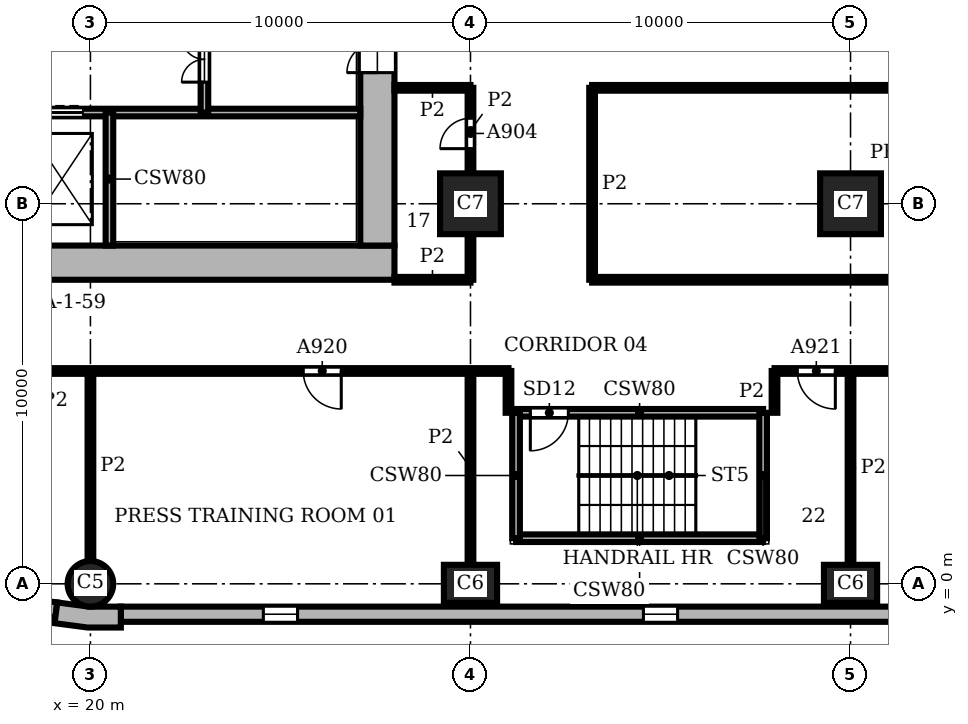
"""IFC4 building model, lengths in metres.
Left out: names, types, materials, properties, quantities, classifications, styles, units other than length and angle.
Written with IfcOpenShell. Run it as: python <this file> out.ifc"""

import sys

from ifc_helpers import new_model, si_unit, direction, frame, frame_2d, origin, origin_2d, place, context, subcontext, project, spatial, polyline, rectangle, circle, outline, extrude, element, fill, save


model = new_model("IFC4")
c1 = context("Model", 3, precision=1e-05, world=origin(), true_north=direction((0.0, 1.0)))
c2 = subcontext(c1, "Body", "Model", "MODEL_VIEW")
j1 = project(units=[si_unit("LENGTHUNIT", "METRE"), si_unit("PLANEANGLEUNIT", "RADIAN")], contexts=[c1])
p1 = place(None, origin())
s1 = spatial("IfcSite", under=j1, at=p1, CompositionType="ELEMENT")
p2 = place(p1, origin())
s2 = spatial("IfcBuilding", under=s1, at=p2, CompositionType="ELEMENT")
p3 = place(p2, frame((0.0, 0.0, 113.4)))
s3 = spatial("IfcBuildingStorey", under=s2, at=p3, CompositionType="ELEMENT", Elevation=113.4)
p4 = place(p3, frame((20.0, 0.0, 0.0), z_axis=(0.0, 0.0, 1.0), x_axis=(1.0, 0.0, 0.0)))
e1 = element("IfcColumn", 1, at=p4, inside=s3, PredefinedType="COLUMN", context=c2, shape_type="SweptSolid", body=[
    extrude(circle(Radius=0.6, at=origin_2d()), origin(), (0.0, 0.0, 1.0), 3.9),
])
for number, where, z_axis, x_axis in (
    (2, (30.0, 0.0, 0.0), (0.0, 0.0, 1.0), (1.0, 0.0, 0.0)),
    (3, (40.0, 0.0, 0.0), (0.0, 0.0, 1.0), (1.0, 0.0, 0.0)),
):
    element("IfcColumn", number, at=place(p3, frame(where, z_axis=z_axis, x_axis=x_axis)), inside=s3, PredefinedType="COLUMN", context=c2, shape_type="SweptSolid", body=[
        extrude(rectangle(XDim=1.4, YDim=1.0, at=origin_2d()), origin(), (0.0, 0.0, 1.0), 3.9),
    ])
for number, where, z_axis, x_axis in (
    (4, (30.0, 10.0, 0.0), (0.0, 0.0, 1.0), (1.0, 0.0, 0.0)),
    (5, (40.0, 10.0, 0.0), (0.0, 0.0, 1.0), (1.0, 0.0, 0.0)),
):
    element("IfcColumn", number, at=place(p3, frame(where, z_axis=z_axis, x_axis=x_axis)), inside=s3, PredefinedType="COLUMN", context=c2, shape_type="SweptSolid", body=[
        extrude(rectangle(XDim=1.6, YDim=1.6, at=origin_2d()), origin(), (0.0, 0.0, 1.0), 3.9),
    ])
p5 = place(p3, frame((8.0, 8.45, 0.0), z_axis=(0.0, 0.0, 1.0), x_axis=(1.0, 0.0, 0.0)))
e6 = element("IfcWall", 6, at=p5, inside=s3, PredefinedType="SHEAR", context=c2, shape_type="SweptSolid", body=[
    extrude(rectangle(XDim=20.0, YDim=0.9, at=frame_2d((10.0, 0.0))), origin(), (0.0, 0.0, 1.0), 3.9),
])
p6 = place(p3, frame((27.55, 8.9, 0.0), z_axis=(0.0, 0.0, 1.0), x_axis=(0.0, 1.0, 0.0)))
e7 = element("IfcWall", 7, at=p6, inside=s3, PredefinedType="SHEAR", context=c2, shape_type="SweptSolid", body=[
    extrude(rectangle(XDim=18.2, YDim=0.9, at=frame_2d((9.1, 0.0))), origin(), (0.0, 0.0, 1.0), 3.9),
])
p7 = place(p6, frame((4.55, 0.0, 0.0)))
e8 = element("IfcOpeningElement", 8, at=p7, cuts=e7, PredefinedType="OPENING", context=c2, shape_type="SweptSolid", body=[
    extrude(rectangle(XDim=1.6, YDim=2.1, at=frame_2d((0.8, 1.05))), frame((0.0, 0.46, 0.0), z_axis=(0.0, -1.0, 0.0), x_axis=(1.0, 0.0, 0.0)), (0.0, 0.0, 1.0), 0.92),
])
p8 = place(p3, origin())
e9 = element("IfcWall", 9, at=p8, inside=s3, PredefinedType="SOLIDWALL", context=c2, shape_type="SweptSolid", body=[
    extrude(outline(polyline([(19.076, -0.887), (19.057, -1.036), (19.925, -1.15), (20.8, -1.15), (20.8, -1.0), (20.8, -0.6), (19.961, -0.6), (19.128, -0.49), (19.076, -0.887)])), origin(), (0.0, 0.0, 1.0), 3.9),
])
p9 = place(p3, frame((20.8, -0.8, 0.0), z_axis=(0.0, 0.0, 1.0), x_axis=(1.0, 0.0, 0.0)))
e10 = element("IfcWall", 10, at=p9, inside=s3, PredefinedType="SOLIDWALL", context=c2, shape_type="SweptSolid", body=[
    extrude(rectangle(XDim=48.4, YDim=0.4, at=frame_2d((24.2, 0.0))), origin(), (0.0, 0.0, 1.0), 3.9),
])
p10 = place(p9, frame((3.75, 0.0, 0.9)))
e11 = element("IfcOpeningElement", 11, at=p10, cuts=e10, PredefinedType="OPENING", context=c2, shape_type="SweptSolid", body=[
    extrude(rectangle(XDim=0.9, YDim=2.35, at=frame_2d((0.45, 1.175))), frame((0.0, 0.21, 0.0), z_axis=(0.0, -1.0, 0.0), x_axis=(1.0, 0.0, 0.0)), (0.0, 0.0, 1.0), 0.42),
])
p11 = place(p9, frame((13.75, 0.0, 0.9)))
e12 = element("IfcOpeningElement", 12, at=p11, cuts=e10, PredefinedType="OPENING", context=c2, shape_type="SweptSolid", body=[
    extrude(rectangle(XDim=0.9, YDim=2.35, at=frame_2d((0.45, 1.175))), frame((0.0, 0.21, 0.0), z_axis=(0.0, -1.0, 0.0), x_axis=(1.0, 0.0, 0.0)), (0.0, 0.0, 1.0), 0.42),
])
p12 = place(p9, frame((23.75, 0.0, 0.9)))
e13 = element("IfcOpeningElement", 13, at=p12, cuts=e10, PredefinedType="OPENING", context=c2, shape_type="SweptSolid", body=[
    extrude(rectangle(XDim=0.9, YDim=2.35, at=frame_2d((0.45, 1.175))), frame((0.0, 0.21, 0.0), z_axis=(0.0, -1.0, 0.0), x_axis=(1.0, 0.0, 0.0)), (0.0, 0.0, 1.0), 0.42),
])
p13 = place(p9, frame((33.75, 0.0, 0.9)))
e14 = element("IfcOpeningElement", 14, at=p13, cuts=e10, PredefinedType="OPENING", context=c2, shape_type="SweptSolid", body=[
    extrude(rectangle(XDim=0.9, YDim=2.35, at=frame_2d((0.45, 1.175))), frame((0.0, 0.21, 0.0), z_axis=(0.0, -1.0, 0.0), x_axis=(1.0, 0.0, 0.0)), (0.0, 0.0, 1.0), 0.42),
])
p14 = place(p9, frame((43.75, 0.0, 0.9)))
e15 = element("IfcOpeningElement", 15, at=p14, cuts=e10, PredefinedType="OPENING", context=c2, shape_type="SweptSolid", body=[
    extrude(rectangle(XDim=0.9, YDim=2.35, at=frame_2d((0.45, 1.175))), frame((0.0, 0.21, 0.0), z_axis=(0.0, -1.0, 0.0), x_axis=(1.0, 0.0, 0.0)), (0.0, 0.0, 1.0), 0.42),
])
p15 = place(p3, frame((15.017, -0.151, 0.0), z_axis=(0.0, 0.0, 1.0), x_axis=(0.991446429508, -0.130514280502, 0.0)))
e16 = element("IfcWall", 16, at=p15, inside=s3, PredefinedType="SOLIDWALL", context=c2, shape_type="SweptSolid", body=[
    extrude(rectangle(XDim=4.121, YDim=0.4, at=frame_2d((2.061, 0.0))), origin(), (0.0, 0.0, 1.0), 3.9),
])
p16 = place(p15, frame((1.611, 0.0, 0.9)))
e17 = element("IfcOpeningElement", 17, at=p16, cuts=e16, PredefinedType="OPENING", context=c2, shape_type="SweptSolid", body=[
    extrude(rectangle(XDim=0.9, YDim=2.35, at=frame_2d((0.45, 1.175))), frame((0.0, 0.21, 0.0), z_axis=(0.0, -1.0, 0.0), x_axis=(1.0, 0.0, 0.0)), (0.0, 0.0, 1.0), 0.42),
])
p17 = place(p3, frame((31.2, 1.2, 0.0), z_axis=(0.0, 0.0, 1.0), x_axis=(1.0, 0.0, 0.0)))
e18 = element("IfcWall", 18, at=p17, inside=s3, PredefinedType="SHEAR", context=c2, shape_type="SweptSolid", body=[
    extrude(rectangle(XDim=6.5, YDim=0.2, at=frame_2d((3.25, 0.0))), origin(), (0.0, 0.0, 1.0), 3.45),
])
p18 = place(p3, frame((31.2, 4.5, 0.0), z_axis=(0.0, 0.0, 1.0), x_axis=(1.0, 0.0, 0.0)))
e19 = element("IfcWall", 19, at=p18, inside=s3, PredefinedType="SHEAR", context=c2, shape_type="SweptSolid", body=[
    extrude(rectangle(XDim=6.5, YDim=0.2, at=frame_2d((3.25, 0.0))), origin(), (0.0, 0.0, 1.0), 3.45),
])
p19 = place(p18, frame((0.375, 0.0, 0.0)))
e20 = element("IfcOpeningElement", 20, at=p19, cuts=e19, PredefinedType="OPENING", context=c2, shape_type="SweptSolid", body=[
    extrude(rectangle(XDim=1.0, YDim=2.1, at=frame_2d((0.5, 1.05))), frame((0.0, 0.11, 0.0), z_axis=(0.0, -1.0, 0.0), x_axis=(1.0, 0.0, 0.0)), (0.0, 0.0, 1.0), 0.22),
])
p20 = place(p3, frame((13.8, 12.4, 0.0), z_axis=(0.0, 0.0, 1.0), x_axis=(1.0, 0.0, 0.0)))
e21 = element("IfcWall", 21, at=p20, inside=s3, PredefinedType="SHEAR", context=c2, shape_type="SweptSolid", body=[
    extrude(rectangle(XDim=13.3, YDim=0.2, at=frame_2d((6.65, 0.0))), origin(), (0.0, 0.0, 1.0), 3.45),
])
p21 = place(p20, frame((2.4, 0.0, 0.0)))
e22 = element("IfcOpeningElement", 22, at=p21, cuts=e21, PredefinedType="OPENING", context=c2, shape_type="SweptSolid", body=[
    extrude(rectangle(XDim=1.1, YDim=2.1, at=frame_2d((0.55, 1.05))), frame((0.0, 0.11, 0.0), z_axis=(0.0, -1.0, 0.0), x_axis=(1.0, 0.0, 0.0)), (0.0, 0.0, 1.0), 0.22),
])
p22 = place(p20, frame((4.9, 0.0, 0.0)))
e23 = element("IfcOpeningElement", 23, at=p22, cuts=e21, PredefinedType="OPENING", context=c2, shape_type="SweptSolid", body=[
    extrude(rectangle(XDim=1.1, YDim=2.1, at=frame_2d((0.55, 1.05))), frame((0.0, 0.11, 0.0), z_axis=(0.0, -1.0, 0.0), x_axis=(1.0, 0.0, 0.0)), (0.0, 0.0, 1.0), 0.22),
])
p23 = place(p20, frame((0.25, 0.0, 0.0)))
e24 = element("IfcOpeningElement", 24, at=p23, cuts=e21, PredefinedType="OPENING", context=c2, shape_type="SweptSolid", body=[
    extrude(rectangle(XDim=1.0, YDim=2.1, at=frame_2d((0.5, 1.05))), frame((0.0, 0.11, 0.0), z_axis=(0.0, -1.0, 0.0), x_axis=(1.0, 0.0, 0.0)), (0.0, 0.0, 1.0), 0.22),
])
p24 = place(p3, frame((20.5, 8.9, 0.0), z_axis=(0.0, 0.0, 1.0), x_axis=(0.0, 1.0, 0.0)))
e25 = element("IfcWall", 25, at=p24, inside=s3, PredefinedType="SHEAR", context=c2, shape_type="SweptSolid", body=[
    extrude(rectangle(XDim=3.5, YDim=0.2, at=frame_2d((1.75, 0.0))), origin(), (0.0, 0.0, 1.0), 3.45),
])
p25 = place(p3, frame((23.0, 12.4, 0.0), z_axis=(0.0, 0.0, 1.0), x_axis=(0.0, 1.0, 0.0)))
e26 = element("IfcWall", 26, at=p25, inside=s3, PredefinedType="SHEAR", context=c2, shape_type="SweptSolid", body=[
    extrude(rectangle(XDim=2.8, YDim=0.2, at=frame_2d((1.4, 0.0))), origin(), (0.0, 0.0, 1.0), 3.45),
])
p26 = place(p25, frame((0.8, 0.0, 0.0)))
e27 = element("IfcOpeningElement", 27, at=p26, cuts=e26, PredefinedType="OPENING", context=c2, shape_type="SweptSolid", body=[
    extrude(rectangle(XDim=1.2, YDim=2.1, at=frame_2d((0.6, 1.05))), frame((0.0, 0.11, 0.0), z_axis=(0.0, -1.0, 0.0), x_axis=(1.0, 0.0, 0.0)), (0.0, 0.0, 1.0), 0.22),
])
for number, where, z_axis, x_axis in (
    (28, (31.2, 1.2, 0.0), (0.0, 0.0, 1.0), (0.0, 1.0, 0.0)),
    (29, (37.7, 1.2, 0.0), (0.0, 0.0, 1.0), (0.0, 1.0, 0.0)),
):
    element("IfcWall", number, at=place(p3, frame(where, z_axis=z_axis, x_axis=x_axis)), inside=s3, PredefinedType="SHEAR", context=c2, shape_type="SweptSolid", body=[
        extrude(rectangle(XDim=3.3, YDim=0.2, at=frame_2d((1.65, 0.0))), origin(), (0.0, 0.0, 1.0), 3.45),
    ])
p27 = place(p3, frame((20.0, 0.6, 0.0), z_axis=(0.0, 0.0, 1.0), x_axis=(0.0, 1.0, 0.0)))
e30 = element("IfcWall", 30, at=p27, inside=s3, PredefinedType="PARTITIONING", context=c2, shape_type="SweptSolid", body=[
    extrude(rectangle(XDim=5.0, YDim=0.15, at=frame_2d((2.5, 0.0))), origin(), (0.0, 0.0, 1.0), 3.45),
])
p28 = place(p3, frame((30.0, 0.5, 0.0), z_axis=(0.0, 0.0, 1.0), x_axis=(0.0, 1.0, 0.0)))
e31 = element("IfcWall", 31, at=p28, inside=s3, PredefinedType="PARTITIONING", context=c2, shape_type="SweptSolid", body=[
    extrude(rectangle(XDim=5.1, YDim=0.15, at=frame_2d((2.55, 0.0))), origin(), (0.0, 0.0, 1.0), 3.45),
])
p29 = place(p3, frame((30.0, 8.0, 0.0), z_axis=(0.0, 0.0, 1.0), x_axis=(0.0, 1.0, 0.0)))
e32 = element("IfcWall", 32, at=p29, inside=s3, PredefinedType="PARTITIONING", context=c2, shape_type="SweptSolid", body=[
    extrude(rectangle(XDim=1.2, YDim=0.15, at=frame_2d((0.6, 0.0))), origin(), (0.0, 0.0, 1.0), 3.45),
])
p30 = place(p3, frame((30.0, 10.8, 0.0), z_axis=(0.0, 0.0, 1.0), x_axis=(0.0, 1.0, 0.0)))
e33 = element("IfcWall", 33, at=p30, inside=s3, PredefinedType="PARTITIONING", context=c2, shape_type="SweptSolid", body=[
    extrude(rectangle(XDim=2.25, YDim=0.15, at=frame_2d((1.125, 0.0))), origin(), (0.0, 0.0, 1.0), 3.45),
])
p31 = place(p30, frame((0.65, 0.0, 0.0)))
e34 = element("IfcOpeningElement", 34, at=p31, cuts=e33, PredefinedType="OPENING", context=c2, shape_type="SweptSolid", body=[
    extrude(rectangle(XDim=0.8, YDim=2.1, at=frame_2d((0.4, 1.05))), frame((0.0, 0.085, 0.0), z_axis=(0.0, -1.0, 0.0), x_axis=(1.0, 0.0, 0.0)), (0.0, 0.0, 1.0), 0.17),
])
p32 = place(p3, frame((31.0, 4.5, 0.0), z_axis=(0.0, 0.0, 1.0), x_axis=(0.0, 1.0, 0.0)))
e35 = element("IfcWall", 35, at=p32, inside=s3, PredefinedType="PARTITIONING", context=c2, shape_type="SweptSolid", body=[
    extrude(rectangle(XDim=1.1, YDim=0.15, at=frame_2d((0.55, 0.0))), origin(), (0.0, 0.0, 1.0), 3.45),
])
p33 = place(p3, frame((33.2, 8.0, 0.0), z_axis=(0.0, 0.0, 1.0), x_axis=(0.0, 1.0, 0.0)))
e36 = element("IfcWall", 36, at=p33, inside=s3, PredefinedType="PARTITIONING", context=c2, shape_type="SweptSolid", body=[
    extrude(rectangle(XDim=5.05, YDim=0.15, at=frame_2d((2.525, 0.0))), origin(), (0.0, 0.0, 1.0), 3.45),
])
p34 = place(p3, frame((38.0, 4.5, 0.0), z_axis=(0.0, 0.0, 1.0), x_axis=(0.0, 1.0, 0.0)))
e37 = element("IfcWall", 37, at=p34, inside=s3, PredefinedType="PARTITIONING", context=c2, shape_type="SweptSolid", body=[
    extrude(rectangle(XDim=1.1, YDim=0.15, at=frame_2d((0.55, 0.0))), origin(), (0.0, 0.0, 1.0), 3.45),
])
p35 = place(p3, frame((40.0, 0.5, 0.0), z_axis=(0.0, 0.0, 1.0), x_axis=(0.0, 1.0, 0.0)))
e38 = element("IfcWall", 38, at=p35, inside=s3, PredefinedType="PARTITIONING", context=c2, shape_type="SweptSolid", body=[
    extrude(rectangle(XDim=5.1, YDim=0.15, at=frame_2d((2.55, 0.0))), origin(), (0.0, 0.0, 1.0), 3.45),
])
p36 = place(p3, frame((5.6, 5.6, 0.0), z_axis=(0.0, 0.0, 1.0), x_axis=(1.0, 0.0, 0.0)))
e39 = element("IfcWall", 39, at=p36, inside=s3, PredefinedType="PARTITIONING", context=c2, shape_type="SweptSolid", body=[
    extrude(rectangle(XDim=25.4, YDim=0.15, at=frame_2d((12.7, 0.0))), origin(), (0.0, 0.0, 1.0), 3.45),
])
p37 = place(p36, frame((3.6, 0.0, 0.0)))
e40 = element("IfcOpeningElement", 40, at=p37, cuts=e39, PredefinedType="OPENING", context=c2, shape_type="SweptSolid", body=[
    extrude(rectangle(XDim=1.0, YDim=2.1, at=frame_2d((0.5, 1.05))), frame((0.0, 0.085, 0.0), z_axis=(0.0, -1.0, 0.0), x_axis=(1.0, 0.0, 0.0)), (0.0, 0.0, 1.0), 0.17),
])
p38 = place(p36, frame((11.75, 0.0, 0.0)))
e41 = element("IfcOpeningElement", 41, at=p38, cuts=e39, PredefinedType="OPENING", context=c2, shape_type="SweptSolid", body=[
    extrude(rectangle(XDim=1.0, YDim=2.1, at=frame_2d((0.5, 1.05))), frame((0.0, 0.085, 0.0), z_axis=(0.0, -1.0, 0.0), x_axis=(1.0, 0.0, 0.0)), (0.0, 0.0, 1.0), 0.17),
])
p39 = place(p36, frame((20.0, 0.0, 0.0)))
e42 = element("IfcOpeningElement", 42, at=p39, cuts=e39, PredefinedType="OPENING", context=c2, shape_type="SweptSolid", body=[
    extrude(rectangle(XDim=1.0, YDim=2.1, at=frame_2d((0.5, 1.05))), frame((0.0, 0.085, 0.0), z_axis=(0.0, -1.0, 0.0), x_axis=(1.0, 0.0, 0.0)), (0.0, 0.0, 1.0), 0.17),
])
p40 = place(p3, frame((38.0, 5.6, 0.0), z_axis=(0.0, 0.0, 1.0), x_axis=(1.0, 0.0, 0.0)))
e43 = element("IfcWall", 43, at=p40, inside=s3, PredefinedType="PARTITIONING", context=c2, shape_type="SweptSolid", body=[
    extrude(rectangle(XDim=27.0, YDim=0.15, at=frame_2d((13.5, 0.0))), origin(), (0.0, 0.0, 1.0), 3.45),
])
p41 = place(p40, frame((0.6, 0.0, 0.0)))
e44 = element("IfcOpeningElement", 44, at=p41, cuts=e43, PredefinedType="OPENING", context=c2, shape_type="SweptSolid", body=[
    extrude(rectangle(XDim=1.0, YDim=2.1, at=frame_2d((0.5, 1.05))), frame((0.0, 0.085, 0.0), z_axis=(0.0, -1.0, 0.0), x_axis=(1.0, 0.0, 0.0)), (0.0, 0.0, 1.0), 0.17),
])
p42 = place(p40, frame((6.1, 0.0, 0.0)))
e45 = element("IfcOpeningElement", 45, at=p42, cuts=e43, PredefinedType="OPENING", context=c2, shape_type="SweptSolid", body=[
    extrude(rectangle(XDim=1.0, YDim=2.1, at=frame_2d((0.5, 1.05))), frame((0.0, 0.085, 0.0), z_axis=(0.0, -1.0, 0.0), x_axis=(1.0, 0.0, 0.0)), (0.0, 0.0, 1.0), 0.17),
])
p43 = place(p40, frame((15.85, 0.0, 0.0)))
e46 = element("IfcOpeningElement", 46, at=p43, cuts=e43, PredefinedType="OPENING", context=c2, shape_type="SweptSolid", body=[
    extrude(rectangle(XDim=1.0, YDim=2.1, at=frame_2d((0.5, 1.05))), frame((0.0, 0.085, 0.0), z_axis=(0.0, -1.0, 0.0), x_axis=(1.0, 0.0, 0.0)), (0.0, 0.0, 1.0), 0.17),
])
p44 = place(p3, frame((28.0, 8.0, 0.0), z_axis=(0.0, 0.0, 1.0), x_axis=(1.0, 0.0, 0.0)))
e47 = element("IfcWall", 47, at=p44, inside=s3, PredefinedType="PARTITIONING", context=c2, shape_type="SweptSolid", body=[
    extrude(rectangle(XDim=2.0, YDim=0.15, at=frame_2d((1.0, 0.0))), origin(), (0.0, 0.0, 1.0), 3.45),
])
p45 = place(p3, frame((33.2, 8.0, 0.0), z_axis=(0.0, 0.0, 1.0), x_axis=(1.0, 0.0, 0.0)))
e48 = element("IfcWall", 48, at=p45, inside=s3, PredefinedType="PARTITIONING", context=c2, shape_type="SweptSolid", body=[
    extrude(rectangle(XDim=29.1, YDim=0.15, at=frame_2d((14.55, 0.0))), origin(), (0.0, 0.0, 1.0), 3.45),
])
p46 = place(p3, frame((28.0, 13.05, 0.0), z_axis=(0.0, 0.0, 1.0), x_axis=(1.0, 0.0, 0.0)))
e49 = element("IfcWall", 49, at=p46, inside=s3, PredefinedType="PARTITIONING", context=c2, shape_type="SweptSolid", body=[
    extrude(rectangle(XDim=2.0, YDim=0.15, at=frame_2d((1.0, 0.0))), origin(), (0.0, 0.0, 1.0), 3.45),
])
p47 = place(p3, frame((33.2, 13.05, 0.0), z_axis=(0.0, 0.0, 1.0), x_axis=(1.0, 0.0, 0.0)))
e50 = element("IfcWall", 50, at=p47, inside=s3, PredefinedType="PARTITIONING", context=c2, shape_type="SweptSolid", body=[
    extrude(rectangle(XDim=29.1, YDim=0.15, at=frame_2d((14.55, 0.0))), origin(), (0.0, 0.0, 1.0), 3.45),
])
p48 = place(p47, frame((14.1, 0.0, 0.0)))
e51 = element("IfcOpeningElement", 51, at=p48, cuts=e50, PredefinedType="OPENING", context=c2, shape_type="SweptSolid", body=[
    extrude(rectangle(XDim=1.0, YDim=2.1, at=frame_2d((0.5, 1.05))), frame((0.0, 0.085, 0.0), z_axis=(0.0, -1.0, 0.0), x_axis=(1.0, 0.0, 0.0)), (0.0, 0.0, 1.0), 0.17),
])
p49 = place(p10, origin())
e52 = element("IfcWindow", 52, at=p49, inside=s3, PartitioningType="SINGLE_PANEL", PredefinedType="WINDOW", context=c2, shape_type="SweptSolid", body=[
    extrude(rectangle(XDim=0.9, YDim=2.35, at=frame_2d((0.45, 1.175))), frame((0.0, 0.16, 0.0), z_axis=(0.0, -1.0, 0.0), x_axis=(1.0, 0.0, 0.0)), (0.0, 0.0, 1.0), 0.06),
])
fill(e11, e52)
p50 = place(p11, origin())
e53 = element("IfcWindow", 53, at=p50, inside=s3, PartitioningType="SINGLE_PANEL", PredefinedType="WINDOW", context=c2, shape_type="SweptSolid", body=[
    extrude(rectangle(XDim=0.9, YDim=2.35, at=frame_2d((0.45, 1.175))), frame((0.0, 0.16, 0.0), z_axis=(0.0, -1.0, 0.0), x_axis=(1.0, 0.0, 0.0)), (0.0, 0.0, 1.0), 0.06),
])
fill(e12, e53)
p51 = place(p22, origin())
e54 = element("IfcDoor", 54, at=p51, inside=s3, OperationType="DOUBLE_DOOR_SLIDING", PredefinedType="DOOR", context=c2, shape_type="SweptSolid", body=[
    extrude(rectangle(XDim=1.1, YDim=2.1, at=frame_2d((0.55, 1.05))), frame((0.0, 0.025, 0.0), z_axis=(0.0, -1.0, 0.0), x_axis=(1.0, 0.0, 0.0)), (0.0, 0.0, 1.0), 0.05),
])
fill(e23, e54)
p52 = place(p19, frame((1.0, 0.0, 0.0), z_axis=(0.0, 0.0, 1.0), x_axis=(-1.0, 0.0, 0.0)))
e55 = element("IfcDoor", 55, at=p52, inside=s3, OperationType="SINGLE_SWING_RIGHT", PredefinedType="DOOR", context=c2, shape_type="SweptSolid", body=[
    extrude(rectangle(XDim=1.0, YDim=2.1, at=frame_2d((0.5, 1.05))), frame((0.0, 0.025, 0.0), z_axis=(0.0, -1.0, 0.0), x_axis=(1.0, 0.0, 0.0)), (0.0, 0.0, 1.0), 0.05),
])
fill(e20, e55)
p53 = place(p26, origin())
e56 = element("IfcDoor", 56, at=p53, inside=s3, OperationType="DOUBLE_DOOR_SINGLE_SWING", PredefinedType="DOOR", context=c2, shape_type="SweptSolid", body=[
    extrude(rectangle(XDim=1.2, YDim=2.1, at=frame_2d((0.6, 1.05))), frame((0.0, 0.025, 0.0), z_axis=(0.0, -1.0, 0.0), x_axis=(1.0, 0.0, 0.0)), (0.0, 0.0, 1.0), 0.05),
])
fill(e27, e56)
p54 = place(p7, origin())
e57 = element("IfcDoor", 57, at=p54, inside=s3, OperationType="DOUBLE_DOOR_SINGLE_SWING", PredefinedType="DOOR", context=c2, shape_type="SweptSolid", body=[
    extrude(rectangle(XDim=1.6, YDim=2.1, at=frame_2d((0.8, 1.05))), frame((0.0, 0.025, 0.0), z_axis=(0.0, -1.0, 0.0), x_axis=(1.0, 0.0, 0.0)), (0.0, 0.0, 1.0), 0.05),
])
fill(e8, e57)
p55 = place(p31, origin())
e58 = element("IfcDoor", 58, at=p55, inside=s3, OperationType="SINGLE_SWING_LEFT", PredefinedType="DOOR", context=c2, shape_type="SweptSolid", body=[
    extrude(rectangle(XDim=0.8, YDim=2.1, at=frame_2d((0.4, 1.05))), frame((0.0, 0.025, 0.0), z_axis=(0.0, -1.0, 0.0), x_axis=(1.0, 0.0, 0.0)), (0.0, 0.0, 1.0), 0.05),
])
fill(e34, e58)
p56 = place(p39, frame((1.0, 0.0, 0.0), z_axis=(0.0, 0.0, 1.0), x_axis=(-1.0, 0.0, 0.0)))
e59 = element("IfcDoor", 59, at=p56, inside=s3, OperationType="SINGLE_SWING_LEFT", PredefinedType="DOOR", context=c2, shape_type="SweptSolid", body=[
    extrude(rectangle(XDim=1.0, YDim=2.1, at=frame_2d((0.5, 1.05))), frame((0.0, 0.025, 0.0), z_axis=(0.0, -1.0, 0.0), x_axis=(1.0, 0.0, 0.0)), (0.0, 0.0, 1.0), 0.05),
])
fill(e42, e59)
p57 = place(p41, frame((1.0, 0.0, 0.0), z_axis=(0.0, 0.0, 1.0), x_axis=(-1.0, 0.0, 0.0)))
e60 = element("IfcDoor", 60, at=p57, inside=s3, OperationType="SINGLE_SWING_LEFT", PredefinedType="DOOR", context=c2, shape_type="SweptSolid", body=[
    extrude(rectangle(XDim=1.0, YDim=2.1, at=frame_2d((0.5, 1.05))), frame((0.0, 0.025, 0.0), z_axis=(0.0, -1.0, 0.0), x_axis=(1.0, 0.0, 0.0)), (0.0, 0.0, 1.0), 0.05),
])
fill(e44, e60)
save(model, sys.argv[1])
